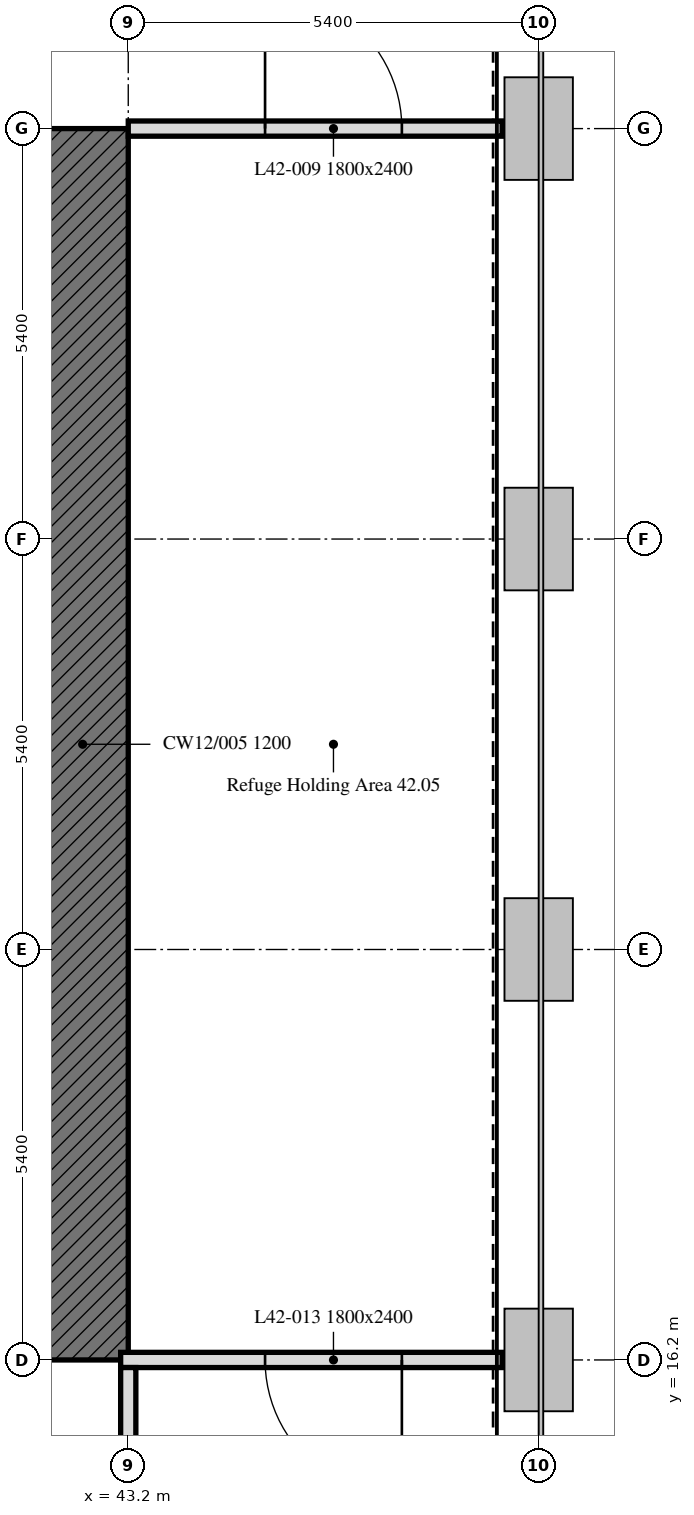
"""IFC4 building model, lengths in metres.
Left out: names, types, materials, properties, quantities, classifications, styles, units other than length and angle.
Written with IfcOpenShell. Run it as: python <this file> out.ifc"""

import sys

from ifc_helpers import new_model, si_unit, direction, frame, frame_2d, origin, place, context, subcontext, project, spatial, rectangle, extrude, element, fill, save


model = new_model("IFC4")
c1 = context("Model", 3, precision=1e-05, world=origin(), true_north=direction((0.0, 1.0)))
c2 = subcontext(c1, "Body", "Model", "MODEL_VIEW")
j1 = project(units=[si_unit("LENGTHUNIT", "METRE"), si_unit("PLANEANGLEUNIT", "RADIAN")], contexts=[c1])
p1 = place(None, origin())
s1 = spatial("IfcSite", under=j1, at=p1, CompositionType="ELEMENT")
p2 = place(p1, origin())
s2 = spatial("IfcBuilding", under=s1, at=p2, CompositionType="ELEMENT")
p3 = place(p2, frame((0.0, 0.0, 175.9)))
s3 = spatial("IfcBuildingStorey", under=s2, at=p3, CompositionType="ELEMENT", Elevation=175.9)
p4 = place(p3, frame((42.6, 32.4, 0.0), z_axis=(0.0, 0.0, 1.0), x_axis=(0.0, -1.0, 0.0)))
e1 = element("IfcWall", 1, at=p4, inside=s3, PredefinedType="SOLIDWALL", context=c2, shape_type="SweptSolid", body=[
    extrude(rectangle(XDim=16.2, YDim=1.2, at=frame_2d((8.1, 0.0))), origin(), (0.0, 0.0, 1.0), 4.5),
])
p5 = place(p3, frame((43.2, 32.4, 0.0), z_axis=(0.0, 0.0, 1.0), x_axis=(1.0, 0.0, 0.0)))
e2 = element("IfcWall", 2, at=p5, inside=s3, PredefinedType="PARTITIONING", context=c2, shape_type="SweptSolid", body=[
    extrude(rectangle(XDim=4.92, YDim=0.2, at=frame_2d((2.46, 0.0))), origin(), (0.0, 0.0, 1.0), 3.9),
])
p6 = place(p5, frame((1.8, 0.0, 0.0)))
e3 = element("IfcOpeningElement", 3, at=p6, cuts=e2, PredefinedType="OPENING", context=c2, shape_type="SweptSolid", body=[
    extrude(rectangle(XDim=1.8, YDim=2.4, at=frame_2d((0.9, 1.2))), frame((0.0, 0.1, 0.0), z_axis=(0.0, -1.0, 0.0), x_axis=(1.0, 0.0, 0.0)), (0.0, 0.0, 1.0), 0.2),
])
p7 = place(p3, frame((48.12, 16.2, 0.0), z_axis=(0.0, 0.0, 1.0), x_axis=(-1.0, 0.0, 0.0)))
e4 = element("IfcWall", 4, at=p7, inside=s3, PredefinedType="PARTITIONING", context=c2, shape_type="SweptSolid", body=[
    extrude(rectangle(XDim=5.02, YDim=0.2, at=frame_2d((2.51, 0.0))), origin(), (0.0, 0.0, 1.0), 3.9),
])
p8 = place(p7, frame((1.32, 0.0, 0.0)))
e5 = element("IfcOpeningElement", 5, at=p8, cuts=e4, PredefinedType="OPENING", context=c2, shape_type="SweptSolid", body=[
    extrude(rectangle(XDim=1.8, YDim=2.4, at=frame_2d((0.9, 1.2))), frame((0.0, 0.1, 0.0), z_axis=(0.0, -1.0, 0.0), x_axis=(1.0, 0.0, 0.0)), (0.0, 0.0, 1.0), 0.2),
])
p9 = place(p3, frame((43.2, 16.1, 0.0), z_axis=(0.0, 0.0, 1.0), x_axis=(0.0, -1.0, 0.0)))
e6 = element("IfcWall", 6, at=p9, inside=s3, PredefinedType="PARTITIONING", context=c2, shape_type="SweptSolid", body=[
    extrude(rectangle(XDim=4.774, YDim=0.2, at=frame_2d((2.387, 0.0))), origin(), (0.0, 0.0, 1.0), 4.5),
])
p10 = place(p6, origin())
e7 = element("IfcDoor", 7, at=p10, inside=s3, OperationType="DOUBLE_DOOR_SINGLE_SWING", PredefinedType="DOOR", context=c2, shape_type="SweptSolid", body=[
    extrude(rectangle(XDim=1.8, YDim=2.4, at=frame_2d((0.9, 1.2))), frame((0.0, 0.025, 0.0), z_axis=(0.0, -1.0, 0.0), x_axis=(1.0, 0.0, 0.0)), (0.0, 0.0, 1.0), 0.05),
])
fill(e3, e7)
p11 = place(p8, origin())
e8 = element("IfcDoor", 8, at=p11, inside=s3, OperationType="DOUBLE_DOOR_SINGLE_SWING", PredefinedType="DOOR", context=c2, shape_type="SweptSolid", body=[
    extrude(rectangle(XDim=1.8, YDim=2.4, at=frame_2d((0.9, 1.2))), frame((0.0, 0.025, 0.0), z_axis=(0.0, -1.0, 0.0), x_axis=(1.0, 0.0, 0.0)), (0.0, 0.0, 1.0), 0.05),
])
fill(e5, e8)
save(model, sys.argv[1])
